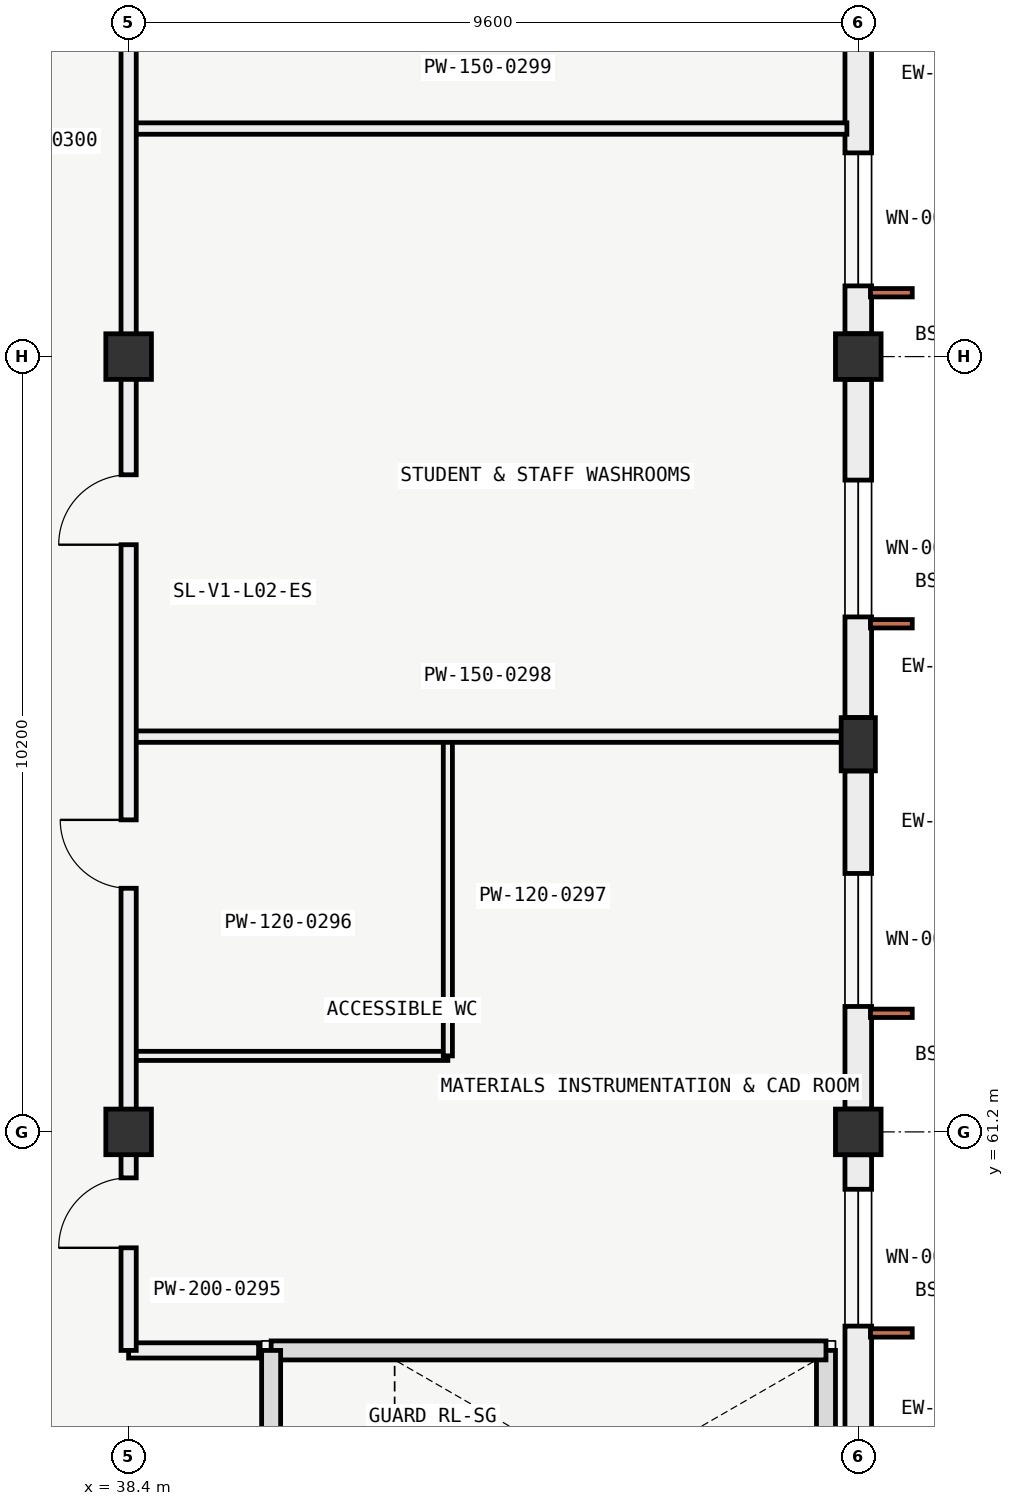
"""IFC4 building model, lengths in metres.
Left out: names, types, materials, properties, quantities, classifications, styles, units other than length and angle.
Written with IfcOpenShell. Run it as: python <this file> out.ifc"""

import sys

from ifc_helpers import new_model, si_unit, direction, frame, frame_2d, origin, origin_2d, place, context, subcontext, project, spatial, rectangle, extrude, element, fill, save


model = new_model("IFC4")
c1 = context("Model", 3, precision=1e-05, world=origin(), true_north=direction((0.0, 1.0)))
c2 = subcontext(c1, "Body", "Model", "MODEL_VIEW")
j1 = project(units=[si_unit("LENGTHUNIT", "METRE"), si_unit("PLANEANGLEUNIT", "RADIAN")], contexts=[c1])
p1 = place(None, origin())
s1 = spatial("IfcSite", under=j1, at=p1, CompositionType="ELEMENT")
p2 = place(p1, origin())
s2 = spatial("IfcBuilding", under=s1, at=p2, CompositionType="ELEMENT")
p3 = place(p2, frame((0.0, 0.0, 9.6)))
s3 = spatial("IfcBuildingStorey", under=s2, at=p3, CompositionType="ELEMENT", Elevation=9.6)
for number, where, z_axis, x_axis in (
    (1, (38.4, 61.2, 0.0), (0.0, 0.0, 1.0), (1.0, 0.0, 0.0)),
    (2, (48.0, 61.2, 0.0), (0.0, 0.0, 1.0), (1.0, 0.0, 0.0)),
    (3, (38.4, 71.4, 0.0), (0.0, 0.0, 1.0), (1.0, 0.0, 0.0)),
    (4, (48.0, 71.4, 0.0), (0.0, 0.0, 1.0), (1.0, 0.0, 0.0)),
):
    element("IfcColumn", number, at=place(p3, frame(where, z_axis=z_axis, x_axis=x_axis)), inside=s3, PredefinedType="COLUMN", context=c2, shape_type="SweptSolid", body=[
        extrude(rectangle(XDim=0.6, YDim=0.6, at=origin_2d()), origin(), (0.0, 0.0, 1.0), 4.2),
    ])
p4 = place(p3, frame((48.0, 66.3, 0.0), z_axis=(0.0, 0.0, 1.0), x_axis=(1.0, 0.0, 0.0)))
e5 = element("IfcColumn", 5, at=p4, inside=s3, PredefinedType="PILASTER", context=c2, shape_type="SweptSolid", body=[
    extrude(rectangle(XDim=0.45, YDim=0.7, at=origin_2d()), origin(), (0.0, 0.0, 1.0), 4.2),
])
p5 = place(p3, frame((48.0, 60.899, 0.0), z_axis=(0.0, 0.0, 1.0), x_axis=(0.0, -1.0, 0.0)))
e6 = element("IfcWall", 6, at=p5, inside=s3, PredefinedType="SOLIDWALL", context=c2, shape_type="SweptSolid", body=[
    extrude(rectangle(XDim=4.448, YDim=0.35, at=frame_2d((2.224, 0.0))), origin(), (0.0, 0.0, 1.0), 3.32),
])
p6 = place(p5, frame((0.454, 0.0, 0.95)))
e7 = element("IfcOpeningElement", 7, at=p6, cuts=e6, PredefinedType="OPENING", context=c2, shape_type="SweptSolid", body=[
    extrude(rectangle(XDim=1.8, YDim=2.1, at=frame_2d((0.9, 1.05))), frame((0.0, 0.185, 0.0), z_axis=(0.0, -1.0, 0.0), x_axis=(1.0, 0.0, 0.0)), (0.0, 0.0, 1.0), 0.37),
])
p7 = place(p3, frame((48.0, 65.949, 0.0), z_axis=(0.0, 0.0, 1.0), x_axis=(0.0, -1.0, 0.0)))
e8 = element("IfcWall", 8, at=p7, inside=s3, PredefinedType="SOLIDWALL", context=c2, shape_type="SweptSolid", body=[
    extrude(rectangle(XDim=4.448, YDim=0.35, at=frame_2d((2.224, 0.0))), origin(), (0.0, 0.0, 1.0), 3.32),
])
p8 = place(p7, frame((1.349, 0.0, 0.95)))
e9 = element("IfcOpeningElement", 9, at=p8, cuts=e8, PredefinedType="OPENING", context=c2, shape_type="SweptSolid", body=[
    extrude(rectangle(XDim=1.75, YDim=2.05, at=frame_2d((0.875, 1.025))), frame((0.0, 0.185, 0.0), z_axis=(0.0, -1.0, 0.0), x_axis=(1.0, 0.0, 0.0)), (0.0, 0.0, 1.0), 0.37),
])
p9 = place(p3, frame((48.0, 71.099, 0.0), z_axis=(0.0, 0.0, 1.0), x_axis=(0.0, -1.0, 0.0)))
e10 = element("IfcWall", 10, at=p9, inside=s3, PredefinedType="SOLIDWALL", context=c2, shape_type="SweptSolid", body=[
    extrude(rectangle(XDim=4.448, YDim=0.35, at=frame_2d((2.224, 0.0))), origin(), (0.0, 0.0, 1.0), 3.32),
])
p10 = place(p9, frame((1.324, 0.0, 0.95)))
e11 = element("IfcOpeningElement", 11, at=p10, cuts=e10, PredefinedType="OPENING", context=c2, shape_type="SweptSolid", body=[
    extrude(rectangle(XDim=1.8, YDim=2.1, at=frame_2d((0.9, 1.05))), frame((0.0, 0.185, 0.0), z_axis=(0.0, -1.0, 0.0), x_axis=(1.0, 0.0, 0.0)), (0.0, 0.0, 1.0), 0.37),
])
p11 = place(p3, frame((48.0, 76.149, 0.0), z_axis=(0.0, 0.0, 1.0), x_axis=(0.0, -1.0, 0.0)))
e12 = element("IfcWall", 12, at=p11, inside=s3, PredefinedType="SOLIDWALL", context=c2, shape_type="SweptSolid", body=[
    extrude(rectangle(XDim=4.448, YDim=0.35, at=frame_2d((2.224, 0.0))), origin(), (0.0, 0.0, 1.0), 3.32),
])
p12 = place(p11, frame((2.069, 0.0, 0.95)))
e13 = element("IfcOpeningElement", 13, at=p12, cuts=e12, PredefinedType="OPENING", context=c2, shape_type="SweptSolid", body=[
    extrude(rectangle(XDim=1.75, YDim=2.05, at=frame_2d((0.875, 1.025))), frame((0.0, 0.185, 0.0), z_axis=(0.0, -1.0, 0.0), x_axis=(1.0, 0.0, 0.0)), (0.0, 0.0, 1.0), 0.37),
])
p13 = place(p3, frame((47.575, 54.875, 0.0), z_axis=(0.0, 0.0, 1.0), x_axis=(0.0, 1.0, 0.0)))
e14 = element("IfcWall", 14, at=p13, inside=s3, PredefinedType="SOLIDWALL", context=c2, shape_type="SweptSolid", body=[
    extrude(rectangle(XDim=3.45, YDim=0.25, at=frame_2d((1.725, 0.0))), origin(), (0.0, 0.0, 1.0), 3.15),
])
p14 = place(p3, frame((47.575, 58.325, 0.0), z_axis=(0.0, 0.0, 1.0), x_axis=(-1.0, 0.0, 0.0)))
e15 = element("IfcWall", 15, at=p14, inside=s3, PredefinedType="SOLIDWALL", context=c2, shape_type="SweptSolid", body=[
    extrude(rectangle(XDim=7.3, YDim=0.25, at=frame_2d((3.65, 0.0))), origin(), (0.0, 0.0, 1.0), 3.15),
])
p15 = place(p3, frame((40.275, 58.325, 0.0), z_axis=(0.0, 0.0, 1.0), x_axis=(0.0, -1.0, 0.0)))
e16 = element("IfcWall", 16, at=p15, inside=s3, PredefinedType="SOLIDWALL", context=c2, shape_type="SweptSolid", body=[
    extrude(rectangle(XDim=3.45, YDim=0.25, at=frame_2d((1.725, 0.0))), origin(), (0.0, 0.0, 1.0), 3.15),
])
p16 = place(p15, frame((1.175, 0.0, 0.0)))
e17 = element("IfcOpeningElement", 17, at=p16, cuts=e16, PredefinedType="OPENING", context=c2, shape_type="SweptSolid", body=[
    extrude(rectangle(XDim=1.1, YDim=2.2, at=frame_2d((0.55, 1.1))), frame((0.0, 0.135, 0.0), z_axis=(0.0, -1.0, 0.0), x_axis=(1.0, 0.0, 0.0)), (0.0, 0.0, 1.0), 0.27),
])
p17 = place(p3, frame((38.4, 58.325, 0.0), z_axis=(0.0, 0.0, 1.0), x_axis=(1.0, 0.0, 0.0)))
e18 = element("IfcWall", 18, at=p17, inside=s3, PredefinedType="PARTITIONING", context=c2, shape_type="SweptSolid", body=[
    extrude(rectangle(XDim=1.71, YDim=0.2, at=frame_2d((0.855, 0.0))), origin(), (0.0, 0.0, 1.0), 3.85),
])
p18 = place(p3, frame((38.4, 62.2, 0.0), z_axis=(0.0, 0.0, 1.0), x_axis=(1.0, 0.0, 0.0)))
e19 = element("IfcWall", 19, at=p18, inside=s3, PredefinedType="PARTITIONING", context=c2, shape_type="SweptSolid", body=[
    extrude(rectangle(XDim=4.2, YDim=0.12, at=frame_2d((2.1, 0.0))), origin(), (0.0, 0.0, 1.0), 3.85),
])
p19 = place(p3, frame((42.6, 62.2, 0.0), z_axis=(0.0, 0.0, 1.0), x_axis=(0.0, 1.0, 0.0)))
e20 = element("IfcWall", 20, at=p19, inside=s3, PredefinedType="PARTITIONING", context=c2, shape_type="SweptSolid", body=[
    extrude(rectangle(XDim=4.2, YDim=0.12, at=frame_2d((2.1, 0.0))), origin(), (0.0, 0.0, 1.0), 3.85),
])
for number, where, z_axis, x_axis in (
    (21, (38.4, 66.4, 0.0), (0.0, 0.0, 1.0), (1.0, 0.0, 0.0)),
    (22, (38.4, 74.4, 0.0), (0.0, 0.0, 1.0), (1.0, 0.0, 0.0)),
):
    element("IfcWall", number, at=place(p3, frame(where, z_axis=z_axis, x_axis=x_axis)), inside=s3, PredefinedType="PARTITIONING", context=c2, shape_type="SweptSolid", body=[
        extrude(rectangle(XDim=9.45, YDim=0.15, at=frame_2d((4.725, 0.0))), origin(), (0.0, 0.0, 1.0), 3.85),
    ])
p20 = place(p3, frame((38.4, 58.325, 0.0), z_axis=(0.0, 0.0, 1.0), x_axis=(0.0, 1.0, 0.0)))
e23 = element("IfcWall", 23, at=p20, inside=s3, PredefinedType="PARTITIONING", context=c2, shape_type="SweptSolid", body=[
    extrude(rectangle(XDim=26.7, YDim=0.2, at=frame_2d((13.35, 0.0))), origin(), (0.0, 0.0, 1.0), 3.56),
])
p21 = place(p20, frame((1.35, 0.0, 0.0)))
e24 = element("IfcOpeningElement", 24, at=p21, cuts=e23, PredefinedType="OPENING", context=c2, shape_type="SweptSolid", body=[
    extrude(rectangle(XDim=0.92, YDim=2.1, at=frame_2d((0.46, 1.05))), frame((0.0, 0.11, 0.0), z_axis=(0.0, -1.0, 0.0), x_axis=(1.0, 0.0, 0.0)), (0.0, 0.0, 1.0), 0.22),
])
p22 = place(p20, frame((6.08, 0.0, 0.0)))
e25 = element("IfcOpeningElement", 25, at=p22, cuts=e23, PredefinedType="OPENING", context=c2, shape_type="SweptSolid", body=[
    extrude(rectangle(XDim=0.9, YDim=2.05, at=frame_2d((0.45, 1.025))), frame((0.0, 0.11, 0.0), z_axis=(0.0, -1.0, 0.0), x_axis=(1.0, 0.0, 0.0)), (0.0, 0.0, 1.0), 0.22),
])
p23 = place(p20, frame((10.6, 0.0, 0.0)))
e26 = element("IfcOpeningElement", 26, at=p23, cuts=e23, PredefinedType="OPENING", context=c2, shape_type="SweptSolid", body=[
    extrude(rectangle(XDim=0.92, YDim=2.1, at=frame_2d((0.46, 1.05))), frame((0.0, 0.11, 0.0), z_axis=(0.0, -1.0, 0.0), x_axis=(1.0, 0.0, 0.0)), (0.0, 0.0, 1.0), 0.22),
])
p24 = place(p20, frame((20.3, 0.0, 0.0)))
e27 = element("IfcOpeningElement", 27, at=p24, cuts=e23, PredefinedType="OPENING", context=c2, shape_type="SweptSolid", body=[
    extrude(rectangle(XDim=0.92, YDim=2.1, at=frame_2d((0.46, 1.05))), frame((0.0, 0.11, 0.0), z_axis=(0.0, -1.0, 0.0), x_axis=(1.0, 0.0, 0.0)), (0.0, 0.0, 1.0), 0.22),
])
p25 = place(p6, origin())
e28 = element("IfcWindow", 28, at=p25, inside=s3, PartitioningType="SINGLE_PANEL", PredefinedType="WINDOW", context=c2, shape_type="SweptSolid", body=[
    extrude(rectangle(XDim=1.8, YDim=2.1, at=frame_2d((0.9, 1.05))), frame((0.0, 0.03, 0.0), z_axis=(0.0, -1.0, 0.0), x_axis=(1.0, 0.0, 0.0)), (0.0, 0.0, 1.0), 0.06),
])
fill(e7, e28)
p26 = place(p8, origin())
e29 = element("IfcWindow", 29, at=p26, inside=s3, PartitioningType="SINGLE_PANEL", PredefinedType="WINDOW", context=c2, shape_type="SweptSolid", body=[
    extrude(rectangle(XDim=1.75, YDim=2.05, at=frame_2d((0.875, 1.025))), frame((0.0, 0.03, 0.0), z_axis=(0.0, -1.0, 0.0), x_axis=(1.0, 0.0, 0.0)), (0.0, 0.0, 1.0), 0.06),
])
fill(e9, e29)
p27 = place(p10, origin())
e30 = element("IfcWindow", 30, at=p27, inside=s3, PartitioningType="SINGLE_PANEL", PredefinedType="WINDOW", context=c2, shape_type="SweptSolid", body=[
    extrude(rectangle(XDim=1.8, YDim=2.1, at=frame_2d((0.9, 1.05))), frame((0.0, 0.03, 0.0), z_axis=(0.0, -1.0, 0.0), x_axis=(1.0, 0.0, 0.0)), (0.0, 0.0, 1.0), 0.06),
])
fill(e11, e30)
p28 = place(p12, origin())
e31 = element("IfcWindow", 31, at=p28, inside=s3, PartitioningType="SINGLE_PANEL", PredefinedType="WINDOW", context=c2, shape_type="SweptSolid", body=[
    extrude(rectangle(XDim=1.75, YDim=2.05, at=frame_2d((0.875, 1.025))), frame((0.0, 0.03, 0.0), z_axis=(0.0, -1.0, 0.0), x_axis=(1.0, 0.0, 0.0)), (0.0, 0.0, 1.0), 0.06),
])
fill(e13, e31)
p29 = place(p21, origin())
e32 = element("IfcDoor", 32, at=p29, inside=s3, OperationType="SINGLE_SWING_LEFT", PredefinedType="DOOR", context=c2, shape_type="SweptSolid", body=[
    extrude(rectangle(XDim=0.92, YDim=2.1, at=frame_2d((0.46, 1.05))), frame((0.0, 0.025, 0.0), z_axis=(0.0, -1.0, 0.0), x_axis=(1.0, 0.0, 0.0)), (0.0, 0.0, 1.0), 0.05),
])
fill(e24, e32)
p30 = place(p22, origin())
e33 = element("IfcDoor", 33, at=p30, inside=s3, OperationType="SINGLE_SWING_RIGHT", PredefinedType="DOOR", context=c2, shape_type="SweptSolid", body=[
    extrude(rectangle(XDim=0.9, YDim=2.05, at=frame_2d((0.45, 1.025))), frame((0.0, 0.025, 0.0), z_axis=(0.0, -1.0, 0.0), x_axis=(1.0, 0.0, 0.0)), (0.0, 0.0, 1.0), 0.05),
])
fill(e25, e33)
p31 = place(p23, origin())
e34 = element("IfcDoor", 34, at=p31, inside=s3, OperationType="SINGLE_SWING_LEFT", PredefinedType="DOOR", context=c2, shape_type="SweptSolid", body=[
    extrude(rectangle(XDim=0.92, YDim=2.1, at=frame_2d((0.46, 1.05))), frame((0.0, 0.025, 0.0), z_axis=(0.0, -1.0, 0.0), x_axis=(1.0, 0.0, 0.0)), (0.0, 0.0, 1.0), 0.05),
])
fill(e26, e34)
save(model, sys.argv[1])
